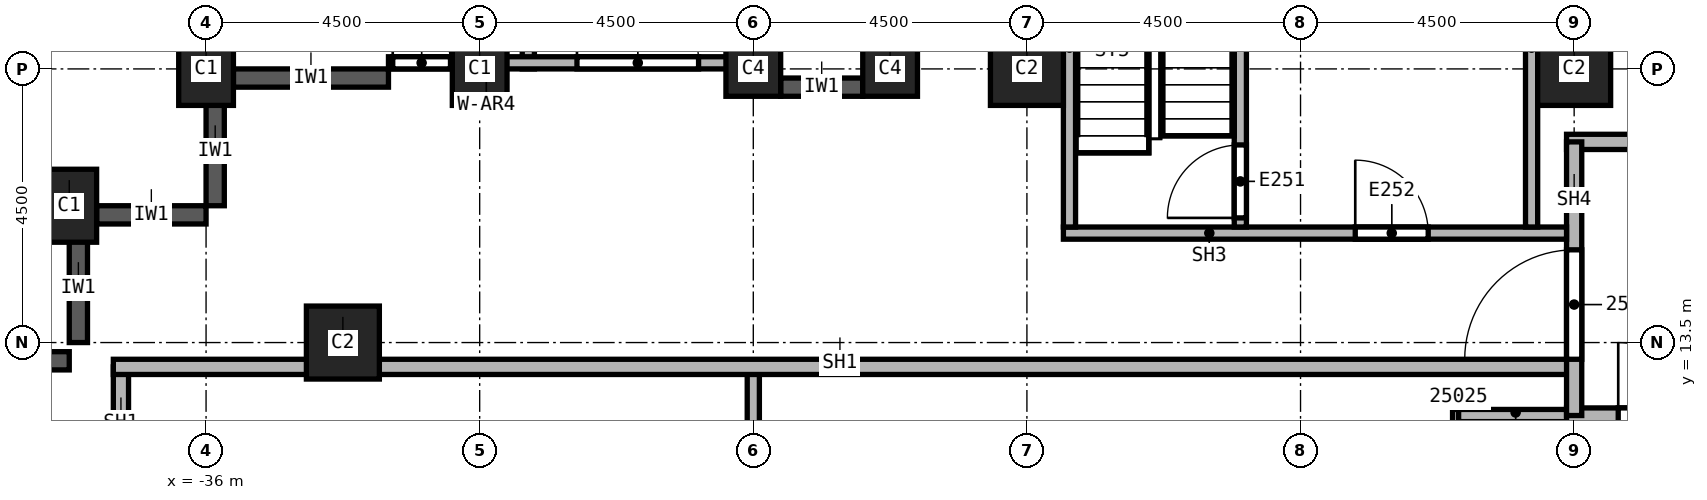
"""IFC4 building model, lengths in metres.
Left out: names, types, materials, properties, quantities, classifications, styles, units other than length and angle.
Written with IfcOpenShell. Run it as: python <this file> out.ifc"""

import sys

from ifc_helpers import new_model, si_unit, direction, frame, frame_2d, origin, origin_2d, place, context, subcontext, project, spatial, rectangle, extrude, element, fill, save


model = new_model("IFC4")
c1 = context("Model", 3, precision=1e-05, world=origin(), true_north=direction((0.0, 1.0)))
c2 = subcontext(c1, "Body", "Model", "MODEL_VIEW")
j1 = project(units=[si_unit("LENGTHUNIT", "METRE"), si_unit("PLANEANGLEUNIT", "RADIAN")], contexts=[c1])
p1 = place(None, origin())
s1 = spatial("IfcSite", under=j1, at=p1, CompositionType="ELEMENT")
p2 = place(p1, origin())
s2 = spatial("IfcBuilding", under=s1, at=p2, CompositionType="ELEMENT")
p3 = place(p2, frame((0.0, 0.0, 60.0)))
s3 = spatial("IfcBuildingStorey", under=s2, at=p3, CompositionType="ELEMENT", Elevation=60.0)
for number, where, z_axis, x_axis in (
    (1, (-38.25, 15.75, 0.0), (0.0, 0.0, 1.0), (1.0, 0.0, 0.0)),
    (2, (-31.5, 18.0, 0.0), (0.0, 0.0, 1.0), (1.0, 0.0, 0.0)),
    (3, (-36.0, 18.0, 0.0), (0.0, 0.0, 1.0), (1.0, 0.0, 0.0)),
):
    element("IfcColumn", number, at=place(p3, frame(where, z_axis=z_axis, x_axis=x_axis)), inside=s3, PredefinedType="COLUMN", context=c2, shape_type="SweptSolid", body=[
        extrude(rectangle(XDim=0.9, YDim=1.2, at=origin_2d()), origin(), (0.0, 0.0, 1.0), 7.7),
    ])
for number, where, z_axis, x_axis in (
    (4, (-33.75, 13.5, 0.0), (0.0, 0.0, 1.0), (1.0, 0.0, 0.0)),
    (5, (-13.5, 18.0, 0.0), (0.0, 0.0, 1.0), (1.0, 0.0, 0.0)),
    (6, (-22.5, 18.0, 0.0), (0.0, 0.0, 1.0), (1.0, 0.0, 0.0)),
):
    element("IfcColumn", number, at=place(p3, frame(where, z_axis=z_axis, x_axis=x_axis)), inside=s3, PredefinedType="COLUMN", context=c2, shape_type="SweptSolid", body=[
        extrude(rectangle(XDim=1.2, YDim=1.2, at=origin_2d()), origin(), (0.0, 0.0, 1.0), 7.7),
    ])
for number, where, z_axis, x_axis in (
    (7, (-27.0, 18.0, 0.0), (0.0, 0.0, 1.0), (1.0, 0.0, 0.0)),
    (8, (-24.75, 18.0, 0.0), (0.0, 0.0, 1.0), (1.0, 0.0, 0.0)),
):
    element("IfcColumn", number, at=place(p3, frame(where, z_axis=z_axis, x_axis=x_axis)), inside=s3, PredefinedType="COLUMN", context=c2, shape_type="SweptSolid", body=[
        extrude(rectangle(XDim=0.9, YDim=0.9, at=origin_2d()), origin(), (0.0, 0.0, 1.0), 7.7),
    ])
for number, where, z_axis, x_axis in (
    (9, (-35.85, 17.55, 0.0), (0.0, 0.0, 1.0), (0.0, -1.0, 0.0)),
    (10, (-37.8, 15.6, 0.0), (0.0, 0.0, 1.0), (1.0, 0.0, 0.0)),
    (11, (-38.1, 15.3, 0.0), (0.0, 0.0, 1.0), (0.0, -1.0, 0.0)),
):
    element("IfcWall", number, at=place(p3, frame(where, z_axis=z_axis, x_axis=x_axis)), inside=s3, PredefinedType="SOLIDWALL", context=c2, shape_type="SweptSolid", body=[
        extrude(rectangle(XDim=1.8, YDim=0.3, at=frame_2d((0.9, 0.0))), origin(), (0.0, 0.0, 1.0), 7.1),
    ])
p4 = place(p3, frame((-39.9, 13.2, 0.0), z_axis=(0.0, 0.0, 1.0), x_axis=(1.0, 0.0, 0.0)))
e12 = element("IfcWall", 12, at=p4, inside=s3, PredefinedType="SOLIDWALL", context=c2, shape_type="SweptSolid", body=[
    extrude(rectangle(XDim=1.65, YDim=0.3, at=frame_2d((0.825, 0.0))), origin(), (0.0, 0.0, 1.0), 7.1),
])
p5 = place(p3, frame((-25.2, 17.7, 0.0), z_axis=(0.0, 0.0, 1.0), x_axis=(-1.0, 0.0, 0.0)))
e13 = element("IfcWall", 13, at=p5, inside=s3, PredefinedType="SOLIDWALL", context=c2, shape_type="SweptSolid", body=[
    extrude(rectangle(XDim=1.35, YDim=0.3, at=frame_2d((0.675, 0.0))), origin(), (0.0, 0.0, 1.0), 7.1),
])
p6 = place(p3, frame((-33.0, 17.85, 0.0), z_axis=(0.0, 0.0, 1.0), x_axis=(-1.0, 0.0, 0.0)))
e14 = element("IfcWall", 14, at=p6, inside=s3, PredefinedType="SOLIDWALL", context=c2, shape_type="SweptSolid", body=[
    extrude(rectangle(XDim=2.55, YDim=0.3, at=frame_2d((1.275, 0.0))), origin(), (0.0, 0.0, 1.0), 7.1),
])
p7 = place(p3, frame((-27.0, 3.75, 0.0), z_axis=(0.0, 0.0, 1.0), x_axis=(0.0, 1.0, 0.0)))
e15 = element("IfcWall", 15, at=p7, inside=s3, PredefinedType="PARTITIONING", context=c2, shape_type="SweptSolid", body=[
    extrude(rectangle(XDim=9.35, YDim=0.2, at=frame_2d((4.675, 0.0))), origin(), (0.0, 0.0, 1.0), 7.7),
])
p8 = place(p3, frame((-15.4, 3.65, 0.0), z_axis=(0.0, 0.0, 1.0), x_axis=(0.0, 1.0, 0.0)))
e16 = element("IfcWall", 16, at=p8, inside=s3, PredefinedType="PARTITIONING", context=c2, shape_type="SweptSolid", body=[
    extrude(rectangle(XDim=8.75, YDim=0.2, at=frame_2d((4.375, 0.0))), origin(), (0.0, 0.0, 1.0), 7.7),
])
p9 = place(p8, frame((7.45, 0.0, 0.0)))
e17 = element("IfcOpeningElement", 17, at=p9, cuts=e16, PredefinedType="OPENING", context=c2, shape_type="SweptSolid", body=[
    extrude(rectangle(XDim=1.0, YDim=2.1, at=frame_2d((0.5, 1.05))), frame((0.0, 0.1, 0.0), z_axis=(0.0, -1.0, 0.0), x_axis=(1.0, 0.0, 0.0)), (0.0, 0.0, 1.0), 0.2),
])
p10 = place(p3, frame((-15.4, 12.3, 0.0), z_axis=(0.0, 0.0, 1.0), x_axis=(1.0, 0.0, 0.0)))
e18 = element("IfcWall", 18, at=p10, inside=s3, PredefinedType="PARTITIONING", context=c2, shape_type="SweptSolid", body=[
    extrude(rectangle(XDim=2.025, YDim=0.2, at=frame_2d((1.012, 0.0))), origin(), (0.0, 0.0, 1.0), 7.7),
])
p11 = place(p3, frame((-37.4, 13.1, 0.0), z_axis=(0.0, 0.0, 1.0), x_axis=(0.0, -1.0, 0.0)))
e19 = element("IfcWall", 19, at=p11, inside=s3, PredefinedType="SOLIDWALL", context=c2, shape_type="SweptSolid", body=[
    extrude(rectangle(XDim=1.85, YDim=0.25, at=frame_2d((0.925, 0.0))), origin(), (0.0, 0.0, 1.0), 7.7),
])
p12 = place(p3, frame((-13.5, 13.1, 0.0), z_axis=(0.0, 0.0, 1.0), x_axis=(-1.0, 0.0, 0.0)))
e20 = element("IfcWall", 20, at=p12, inside=s3, PredefinedType="SOLIDWALL", context=c2, shape_type="SweptSolid", body=[
    extrude(rectangle(XDim=24.025, YDim=0.25, at=frame_2d((12.012, 0.0))), origin(), (0.0, 0.0, 1.0), 7.7),
])
p13 = place(p3, frame((-13.625, 12.3, 0.0), z_axis=(0.0, 0.0, 1.0), x_axis=(1.0, 0.0, 0.0)))
e21 = element("IfcWall", 21, at=p13, inside=s3, PredefinedType="SOLIDWALL", context=c2, shape_type="SweptSolid", body=[
    extrude(rectangle(XDim=9.25, YDim=0.25, at=frame_2d((4.625, 0.0))), origin(), (0.0, 0.0, 1.0), 7.7),
])
p14 = place(p13, frame((0.85, 0.0, 0.0)))
e22 = element("IfcOpeningElement", 22, at=p14, cuts=e21, PredefinedType="OPENING", context=c2, shape_type="SweptSolid", body=[
    extrude(rectangle(XDim=1.2, YDim=2.1, at=frame_2d((0.6, 1.05))), frame((0.0, 0.125, 0.0), z_axis=(0.0, -1.0, 0.0), x_axis=(1.0, 0.0, 0.0)), (0.0, 0.0, 1.0), 0.25),
])
p15 = place(p3, frame((-13.625, 16.8, 0.0), z_axis=(0.0, 0.0, 1.0), x_axis=(1.0, 0.0, 0.0)))
e23 = element("IfcWall", 23, at=p15, inside=s3, PredefinedType="SOLIDWALL", context=c2, shape_type="SweptSolid", body=[
    extrude(rectangle(XDim=9.225, YDim=0.25, at=frame_2d((4.613, 0.0))), origin(), (0.0, 0.0, 1.0), 7.7),
])
p16 = place(p3, frame((-13.5, 12.3, 0.0), z_axis=(0.0, 0.0, 1.0), x_axis=(0.0, 1.0, 0.0)))
e24 = element("IfcWall", 24, at=p16, inside=s3, PredefinedType="SOLIDWALL", context=c2, shape_type="SweptSolid", body=[
    extrude(rectangle(XDim=4.5, YDim=0.25, at=frame_2d((2.25, 0.0))), origin(), (0.0, 0.0, 1.0), 7.7),
])
p17 = place(p16, frame((0.925, 0.0, 0.0)))
e25 = element("IfcOpeningElement", 25, at=p17, cuts=e24, PredefinedType="OPENING", context=c2, shape_type="SweptSolid", body=[
    extrude(rectangle(XDim=1.8, YDim=2.1, at=frame_2d((0.9, 1.05))), frame((0.0, 0.125, 0.0), z_axis=(0.0, -1.0, 0.0), x_axis=(1.0, 0.0, 0.0)), (0.0, 0.0, 1.0), 0.25),
])
p18 = place(p3, frame((-21.9, 15.3, 0.0), z_axis=(0.0, 0.0, 1.0), x_axis=(1.0, 0.0, 0.0)))
e26 = element("IfcWall", 26, at=p18, inside=s3, PredefinedType="SOLIDWALL", context=c2, shape_type="SweptSolid", body=[
    extrude(rectangle(XDim=8.275, YDim=0.2, at=frame_2d((4.137, 0.0))), origin(), (0.0, 0.0, 1.0), 7.7),
])
p19 = place(p18, frame((4.8, 0.0, 0.0)))
e27 = element("IfcOpeningElement", 27, at=p19, cuts=e26, PredefinedType="OPENING", context=c2, shape_type="SweptSolid", body=[
    extrude(rectangle(XDim=1.2, YDim=2.1, at=frame_2d((0.6, 1.05))), frame((0.0, 0.1, 0.0), z_axis=(0.0, -1.0, 0.0), x_axis=(1.0, 0.0, 0.0)), (0.0, 0.0, 1.0), 0.2),
])
for number, where, z_axis, x_axis in (
    (28, (-21.8, 15.4, 0.0), (0.0, 0.0, 1.0), (0.0, 1.0, 0.0)),
    (29, (-14.2, 15.4, 0.0), (0.0, 0.0, 1.0), (0.0, 1.0, 0.0)),
):
    element("IfcWall", number, at=place(p3, frame(where, z_axis=z_axis, x_axis=x_axis)), inside=s3, PredefinedType="SOLIDWALL", context=c2, shape_type="SweptSolid", body=[
        extrude(rectangle(XDim=5.9, YDim=0.2, at=frame_2d((2.95, 0.0))), origin(), (0.0, 0.0, 1.0), 7.7),
    ])
p20 = place(p3, frame((-18.99, 15.4, 0.0), z_axis=(0.0, 0.0, 1.0), x_axis=(0.0, 1.0, 0.0)))
e30 = element("IfcWall", 30, at=p20, inside=s3, PredefinedType="SOLIDWALL", context=c2, shape_type="SweptSolid", body=[
    extrude(rectangle(XDim=5.9, YDim=0.2, at=frame_2d((2.95, 0.0))), origin(), (0.0, 0.0, 1.0), 7.7),
])
p21 = place(p20, frame((0.15, 0.0, 0.0)))
e31 = element("IfcOpeningElement", 31, at=p21, cuts=e30, PredefinedType="OPENING", context=c2, shape_type="SweptSolid", body=[
    extrude(rectangle(XDim=1.2, YDim=2.1, at=frame_2d((0.6, 1.05))), frame((0.0, 0.1, 0.0), z_axis=(0.0, -1.0, 0.0), x_axis=(1.0, 0.0, 0.0)), (0.0, 0.0, 1.0), 0.2),
])
p22 = place(p3, frame((-27.1, 18.1, 0.0), z_axis=(0.0, 0.0, 1.0), x_axis=(0.0, 1.0, 0.0)))
e32 = element("IfcWall", 32, at=p22, inside=s3, PredefinedType="SOLIDWALL", context=c2, shape_type="SweptSolid", body=[
    extrude(rectangle(XDim=17.8, YDim=0.2, at=frame_2d((8.9, 0.0))), origin(), (0.0, 0.0, 1.0), 8.0),
])
p23 = place(p22, frame((1.8, 0.0, 0.0)))
e33 = element("IfcOpeningElement", 33, at=p23, cuts=e32, PredefinedType="OPENING", context=c2, shape_type="SweptSolid", body=[
    extrude(rectangle(XDim=2.0, YDim=2.4, at=frame_2d((1.0, 1.2))), frame((0.0, 0.1, 0.0), z_axis=(0.0, -1.0, 0.0), x_axis=(1.0, 0.0, 0.0)), (0.0, 0.0, 1.0), 0.2),
])
p24 = place(p22, frame((4.4, 0.0, 0.0)))
e34 = element("IfcOpeningElement", 34, at=p24, cuts=e32, PredefinedType="OPENING", context=c2, shape_type="SweptSolid", body=[
    extrude(rectangle(XDim=2.0, YDim=2.4, at=frame_2d((1.0, 1.2))), frame((0.0, 0.1, 0.0), z_axis=(0.0, -1.0, 0.0), x_axis=(1.0, 0.0, 0.0)), (0.0, 0.0, 1.0), 0.2),
])
p25 = place(p3, frame((-30.7, 18.0, 0.0), z_axis=(0.0, 0.0, 1.0), x_axis=(0.0, 1.0, 0.0)))
e35 = element("IfcWall", 35, at=p25, inside=s3, PredefinedType="SOLIDWALL", context=c2, shape_type="SweptSolid", body=[
    extrude(rectangle(XDim=14.8, YDim=0.2, at=frame_2d((7.4, 0.0))), origin(), (0.0, 0.0, 1.0), 8.0),
])
p26 = place(p3, frame((-33.0, 18.1, 0.0), z_axis=(0.0, 0.0, 1.0), x_axis=(1.0, 0.0, 0.0)))
e36 = element("IfcWall", 36, at=p26, inside=s3, PredefinedType="SOLIDWALL", context=c2, shape_type="SweptSolid", body=[
    extrude(rectangle(XDim=6.0, YDim=0.2, at=frame_2d((3.0, 0.0))), origin(), (0.0, 0.0, 1.0), 8.0),
])
p27 = place(p26, frame((3.1, 0.0, 0.0)))
e37 = element("IfcOpeningElement", 37, at=p27, cuts=e36, PredefinedType="OPENING", context=c2, shape_type="SweptSolid", body=[
    extrude(rectangle(XDim=2.0, YDim=2.4, at=frame_2d((1.0, 1.2))), frame((0.0, 0.1, 0.0), z_axis=(0.0, -1.0, 0.0), x_axis=(1.0, 0.0, 0.0)), (0.0, 0.0, 1.0), 0.2),
])
p28 = place(p26, frame((0.07, 0.0, 0.0)))
e38 = element("IfcOpeningElement", 38, at=p28, cuts=e36, PredefinedType="OPENING", context=c2, shape_type="SweptSolid", body=[
    extrude(rectangle(XDim=0.95, YDim=2.4, at=frame_2d((0.475, 1.2))), frame((0.0, 0.1, 0.0), z_axis=(0.0, -1.0, 0.0), x_axis=(1.0, 0.0, 0.0)), (0.0, 0.0, 1.0), 0.2),
])
p29 = place(p17, origin())
e39 = element("IfcDoor", 39, at=p29, inside=s3, OperationType="SINGLE_SWING_RIGHT", PredefinedType="DOOR", context=c2, shape_type="SweptSolid", body=[
    extrude(rectangle(XDim=1.8, YDim=2.1, at=frame_2d((0.9, 1.05))), frame((0.0, 0.025, 0.0), z_axis=(0.0, -1.0, 0.0), x_axis=(1.0, 0.0, 0.0)), (0.0, 0.0, 1.0), 0.05),
])
fill(e25, e39)
p30 = place(p14, origin())
e40 = element("IfcDoor", 40, at=p30, inside=s3, OperationType="SINGLE_SWING_LEFT", PredefinedType="DOOR", context=c2, shape_type="SweptSolid", body=[
    extrude(rectangle(XDim=1.2, YDim=2.1, at=frame_2d((0.6, 1.05))), frame((0.0, 0.025, 0.0), z_axis=(0.0, -1.0, 0.0), x_axis=(1.0, 0.0, 0.0)), (0.0, 0.0, 1.0), 0.05),
])
fill(e22, e40)
p31 = place(p21, origin())
e41 = element("IfcDoor", 41, at=p31, inside=s3, OperationType="SINGLE_SWING_LEFT", PredefinedType="DOOR", context=c2, shape_type="SweptSolid", body=[
    extrude(rectangle(XDim=1.2, YDim=2.1, at=frame_2d((0.6, 1.05))), frame((0.0, 0.025, 0.0), z_axis=(0.0, -1.0, 0.0), x_axis=(1.0, 0.0, 0.0)), (0.0, 0.0, 1.0), 0.05),
])
fill(e31, e41)
p32 = place(p19, origin())
e42 = element("IfcDoor", 42, at=p32, inside=s3, OperationType="SINGLE_SWING_RIGHT", PredefinedType="DOOR", context=c2, shape_type="SweptSolid", body=[
    extrude(rectangle(XDim=1.2, YDim=2.1, at=frame_2d((0.6, 1.05))), frame((0.0, 0.025, 0.0), z_axis=(0.0, -1.0, 0.0), x_axis=(1.0, 0.0, 0.0)), (0.0, 0.0, 1.0), 0.05),
])
fill(e27, e42)
p33 = place(p27, frame((2.0, 0.0, 0.0), z_axis=(0.0, 0.0, 1.0), x_axis=(-1.0, 0.0, 0.0)))
e43 = element("IfcDoor", 43, at=p33, inside=s3, OperationType="DOUBLE_DOOR_SINGLE_SWING", PredefinedType="DOOR", context=c2, shape_type="SweptSolid", body=[
    extrude(rectangle(XDim=2.0, YDim=2.4, at=frame_2d((1.0, 1.2))), frame((0.0, 0.025, 0.0), z_axis=(0.0, -1.0, 0.0), x_axis=(1.0, 0.0, 0.0)), (0.0, 0.0, 1.0), 0.05),
])
fill(e37, e43)
p34 = place(p28, frame((0.95, 0.0, 0.0), z_axis=(0.0, 0.0, 1.0), x_axis=(-1.0, 0.0, 0.0)))
e44 = element("IfcDoor", 44, at=p34, inside=s3, OperationType="SINGLE_SWING_LEFT", PredefinedType="DOOR", context=c2, shape_type="SweptSolid", body=[
    extrude(rectangle(XDim=0.95, YDim=2.4, at=frame_2d((0.475, 1.2))), frame((0.0, 0.025, 0.0), z_axis=(0.0, -1.0, 0.0), x_axis=(1.0, 0.0, 0.0)), (0.0, 0.0, 1.0), 0.05),
])
fill(e38, e44)
save(model, sys.argv[1])
